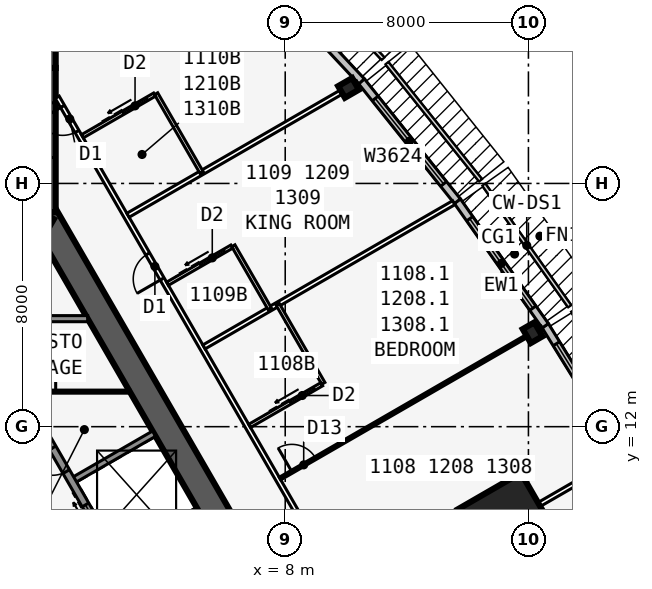
"""IFC4 building model, lengths in metres.
Left out: names, types, materials, properties, quantities, classifications, styles, units other than length and angle.
Written with IfcOpenShell. Run it as: python <this file> out.ifc"""

import sys

from ifc_helpers import new_model, si_unit, direction, frame, frame_2d, origin, origin_2d, place, context, subcontext, project, spatial, rectangle, i_section, extrude, element, fill, save


model = new_model("IFC4")
c1 = context("Model", 3, precision=1e-05, world=origin(), true_north=direction((0.0, 1.0)))
c2 = subcontext(c1, "Body", "Model", "MODEL_VIEW")
j1 = project(units=[si_unit("LENGTHUNIT", "METRE"), si_unit("PLANEANGLEUNIT", "RADIAN")], contexts=[c1])
p1 = place(None, origin())
s1 = spatial("IfcSite", under=j1, at=p1, CompositionType="ELEMENT")
p2 = place(p1, origin())
s2 = spatial("IfcBuilding", under=s1, at=p2, CompositionType="ELEMENT")
p3 = place(p2, frame((0.0, 0.0, 48.9)))
s3 = spatial("IfcBuildingStorey", under=s2, at=p3, CompositionType="ELEMENT", Elevation=48.9)
p4 = place(p3, frame((16.5, -9.526, 0.0), z_axis=(0.0, 0.0, 1.0), x_axis=(-0.499999749417, 0.866025548458, 0.0)))
e1 = element("IfcWall", 1, at=p4, inside=s3, PredefinedType="SHEAR", context=c2, shape_type="SweptSolid", body=[
    extrude(rectangle(XDim=33.0, YDim=0.9, at=frame_2d((16.5, 0.0))), origin(), (0.0, 0.0, 1.0), 3.4),
])
p5 = place(p4, frame((14.15, 0.0, 0.0)))
e2 = element("IfcOpeningElement", 2, at=p5, cuts=e1, PredefinedType="OPENING", context=c2, shape_type="SweptSolid", body=[
    extrude(rectangle(XDim=1.8, YDim=2.13, at=frame_2d((0.9, 1.065))), frame((0.0, 0.46, 0.0), z_axis=(0.0, -1.0, 0.0), x_axis=(1.0, 0.0, 0.0)), (0.0, 0.0, 1.0), 0.92),
])
p6 = place(p4, frame((12.6, 0.0, 0.0)))
e3 = element("IfcOpeningElement", 3, at=p6, cuts=e1, PredefinedType="OPENING", context=c2, shape_type="SweptSolid", body=[
    extrude(rectangle(XDim=1.0, YDim=2.13, at=frame_2d((0.5, 1.065))), frame((0.0, 0.46, 0.0), z_axis=(0.0, -1.0, 0.0), x_axis=(1.0, 0.0, 0.0)), (0.0, 0.0, 1.0), 0.92),
])
p7 = place(p3, frame((5.379, 2.586, 0.0), z_axis=(0.0, 0.0, 1.0), x_axis=(-0.500001375892, 0.866024609411, 0.0)))
e4 = element("IfcWall", 4, at=p7, inside=s3, PredefinedType="SOLIDWALL", context=c2, shape_type="SweptSolid", body=[
    extrude(rectangle(XDim=10.633, YDim=0.25, at=frame_2d((5.316, 0.0))), origin(), (0.0, 0.0, 1.0), 3.235),
])
p8 = place(p7, frame((9.164, 0.0, 0.0)))
e5 = element("IfcOpeningElement", 5, at=p8, cuts=e4, PredefinedType="OPENING", context=c2, shape_type="SweptSolid", body=[
    extrude(rectangle(XDim=0.9, YDim=2.13, at=frame_2d((0.45, 1.065))), frame((0.0, 0.135, 0.0), z_axis=(0.0, -1.0, 0.0), x_axis=(1.0, 0.0, 0.0)), (0.0, 0.0, 1.0), 0.27),
])
p9 = place(p7, frame((1.0, 0.0, 0.0)))
e6 = element("IfcOpeningElement", 6, at=p9, cuts=e4, PredefinedType="OPENING", context=c2, shape_type="SweptSolid", body=[
    extrude(rectangle(XDim=1.1, YDim=2.13, at=frame_2d((0.55, 1.065))), frame((0.0, 0.135, 0.0), z_axis=(0.0, -1.0, 0.0), x_axis=(1.0, 0.0, 0.0)), (0.0, 0.0, 1.0), 0.27),
])
p10 = place(p7, frame((3.9, 0.0, 0.0)))
e7 = element("IfcOpeningElement", 7, at=p10, cuts=e4, PredefinedType="OPENING", context=c2, shape_type="SweptSolid", body=[
    extrude(rectangle(XDim=1.1, YDim=2.13, at=frame_2d((0.55, 1.065))), frame((0.0, 0.135, 0.0), z_axis=(0.0, -1.0, 0.0), x_axis=(1.0, 0.0, 0.0)), (0.0, 0.0, 1.0), 0.27),
])
p11 = place(p7, frame((6.8, 0.0, 0.0)))
e8 = element("IfcOpeningElement", 8, at=p11, cuts=e4, PredefinedType="OPENING", context=c2, shape_type="SweptSolid", body=[
    extrude(rectangle(XDim=1.1, YDim=2.13, at=frame_2d((0.55, 1.065))), frame((0.0, 0.135, 0.0), z_axis=(0.0, -1.0, 0.0), x_axis=(1.0, 0.0, 0.0)), (0.0, 0.0, 1.0), 0.27),
])
for number, where, z_axis, x_axis in (
    (9, (2.429, 7.696, 0.0), (0.0, 0.0, 1.0), (0.866, 0.5, 0.0)),
    (10, (0.979, 10.207, 0.0), (0.0, 0.0, 1.0), (0.866, 0.5, 0.0)),
):
    element("IfcWall", number, at=place(p3, frame(where, z_axis=z_axis, x_axis=x_axis)), inside=s3, PredefinedType="SOLIDWALL", context=c2, shape_type="SweptSolid", body=[
        extrude(rectangle(XDim=3.125, YDim=0.2, at=frame_2d((1.562, 0.0))), origin(), (0.0, 0.0, 1.0), 3.235),
    ])
p12 = place(p3, frame((0.0, 19.052, 0.0), z_axis=(0.0, 0.0, 1.0), x_axis=(-0.499999749417, -0.866025548458, 0.0)))
e11 = element("IfcWall", 11, at=p12, inside=s3, PredefinedType="SHEAR", context=c2, shape_type="SweptSolid", body=[
    extrude(rectangle(XDim=33.0, YDim=0.9, at=frame_2d((16.5, 0.0))), origin(), (0.0, 0.0, 1.0), 3.4),
])
p13 = place(p12, frame((14.15, 0.0, 0.0)))
e12 = element("IfcOpeningElement", 12, at=p13, cuts=e11, PredefinedType="OPENING", context=c2, shape_type="SweptSolid", body=[
    extrude(rectangle(XDim=1.8, YDim=2.13, at=frame_2d((0.9, 1.065))), frame((0.0, 0.46, 0.0), z_axis=(0.0, -1.0, 0.0), x_axis=(1.0, 0.0, 0.0)), (0.0, 0.0, 1.0), 0.92),
])
p14 = place(p12, frame((12.6, 0.0, 0.0)))
e13 = element("IfcOpeningElement", 13, at=p14, cuts=e11, PredefinedType="OPENING", context=c2, shape_type="SweptSolid", body=[
    extrude(rectangle(XDim=1.0, YDim=2.13, at=frame_2d((0.5, 1.065))), frame((0.0, 0.46, 0.0), z_axis=(0.0, -1.0, 0.0), x_axis=(1.0, 0.0, 0.0)), (0.0, 0.0, 1.0), 0.92),
])
p15 = place(p3, frame((0.0, 19.052, 0.0), z_axis=(0.0, 0.0, 1.0), x_axis=(0.0, 1.0, 0.0)))
e14 = element("IfcWall", 14, at=p15, inside=s3, PredefinedType="SHEAR", context=c2, shape_type="SweptSolid", body=[
    extrude(rectangle(XDim=4.746, YDim=0.9, at=frame_2d((2.373, 0.0))), origin(), (0.0, 0.0, 1.0), 3.4),
])
p16 = place(p15, frame((1.8, 0.0, 0.0)))
e15 = element("IfcOpeningElement", 15, at=p16, cuts=e14, PredefinedType="OPENING", context=c2, shape_type="SweptSolid", body=[
    extrude(rectangle(XDim=1.8, YDim=2.13, at=frame_2d((0.9, 1.065))), frame((0.0, 0.46, 0.0), z_axis=(0.0, -1.0, 0.0), x_axis=(1.0, 0.0, 0.0)), (0.0, 0.0, 1.0), 0.92),
])
p17 = place(p3, frame((0.0, 23.799, 0.0), z_axis=(0.0, 0.0, 1.0), x_axis=(0.0, 1.0, 0.0)))
e16 = element("IfcWall", 16, at=p17, inside=s3, PredefinedType="SHEAR", context=c2, shape_type="SweptSolid", body=[
    extrude(rectangle(XDim=1.155, YDim=0.9, at=frame_2d((0.577, 0.0))), origin(), (0.0, 0.0, 1.0), 3.4),
])
for number, where, z_axis, x_axis in (
    (17, (16.137, 15.09, 0.0), (0.0, 0.0, 1.0), (0.866, 0.5, 0.0)),
    (18, (10.083, 23.142, 0.0), (0.0, 0.0, 1.0), (-0.5, 0.866, 0.0)),
):
    element("IfcColumn", number, at=place(p3, frame(where, z_axis=z_axis, x_axis=x_axis)), inside=s3, PredefinedType="COLUMN", context=c2, shape_type="SweptSolid", body=[
        extrude(i_section(OverallWidth=0.442, OverallDepth=0.531, WebThickness=0.066, FlangeThickness=0.106, at=origin_2d()), origin(), (0.0, 0.0, 1.0), 3.4),
    ])
p18 = place(p3, frame((15.312, 8.84, 0.0), z_axis=(0.0, 0.0, 1.0), x_axis=(0.866025403784, 0.5, 0.0)))
e19 = element("IfcColumn", 19, at=p18, inside=s3, PredefinedType="COLUMN", context=c2, shape_type="SweptSolid", body=[
    extrude(rectangle(XDim=2.4, YDim=2.4, at=origin_2d()), origin(), (0.0, 0.0, 1.0), 3.4),
])
p19 = place(p3, frame((19.182, 11.071, 0.0), z_axis=(0.0, 0.0, 1.0), x_axis=(-0.526132807704, 0.850402415717, 0.0)))
e20 = element("IfcWall", 20, at=p19, inside=s3, PredefinedType="STANDARD", context=c2, shape_type="SweptSolid", body=[
    extrude(rectangle(XDim=5.002, YDim=0.25, at=frame_2d((2.501, 0.0))), origin(), (0.0, 0.0, 1.0), 3.235),
])
p20 = place(p19, frame((0.701, 0.0, 0.45)))
e21 = element("IfcOpeningElement", 21, at=p20, cuts=e20, PredefinedType="OPENING", context=c2, shape_type="SweptSolid", body=[
    extrude(rectangle(XDim=3.6, YDim=2.4, at=frame_2d((1.8, 1.2))), frame((0.0, 0.135, 0.0), z_axis=(0.0, -1.0, 0.0), x_axis=(1.0, 0.0, 0.0)), (0.0, 0.0, 1.0), 0.27),
])
p21 = place(p3, frame((16.555, 15.318, 0.0), z_axis=(0.0, 0.0, 1.0), x_axis=(-0.5766431066, 0.81699616132, 0.0)))
e22 = element("IfcWall", 22, at=p21, inside=s3, PredefinedType="STANDARD", context=c2, shape_type="SweptSolid", body=[
    extrude(rectangle(XDim=5.021, YDim=0.25, at=frame_2d((2.51, 0.0))), origin(), (0.0, 0.0, 1.0), 3.235),
])
p22 = place(p21, frame((0.71, 0.0, 0.45)))
e23 = element("IfcOpeningElement", 23, at=p22, cuts=e22, PredefinedType="OPENING", context=c2, shape_type="SweptSolid", body=[
    extrude(rectangle(XDim=3.6, YDim=2.4, at=frame_2d((1.8, 1.2))), frame((0.0, 0.135, 0.0), z_axis=(0.0, -1.0, 0.0), x_axis=(1.0, 0.0, 0.0)), (0.0, 0.0, 1.0), 0.27),
])
p23 = place(p3, frame((13.664, 19.414, 0.0), z_axis=(0.0, 0.0, 1.0), x_axis=(-0.624594965756, 0.780948864364, 0.0)))
e24 = element("IfcWall", 24, at=p23, inside=s3, PredefinedType="STANDARD", context=c2, shape_type="SweptSolid", body=[
    extrude(rectangle(XDim=5.058, YDim=0.25, at=frame_2d((2.529, 0.0))), origin(), (0.0, 0.0, 1.0), 3.235),
])
p24 = place(p23, frame((0.729, 0.0, 0.45)))
e25 = element("IfcOpeningElement", 25, at=p24, cuts=e24, PredefinedType="OPENING", context=c2, shape_type="SweptSolid", body=[
    extrude(rectangle(XDim=3.6, YDim=2.4, at=frame_2d((1.8, 1.2))), frame((0.0, 0.135, 0.0), z_axis=(0.0, -1.0, 0.0), x_axis=(1.0, 0.0, 0.0)), (0.0, 0.0, 1.0), 0.27),
])
p25 = place(p3, frame((10.511, 23.357, 0.0), z_axis=(0.0, 0.0, 1.0), x_axis=(-0.682289646561, 0.731081964075, 0.0)))
e26 = element("IfcWall", 26, at=p25, inside=s3, PredefinedType="STANDARD", context=c2, shape_type="SweptSolid", body=[
    extrude(rectangle(XDim=8.211, YDim=0.25, at=frame_2d((4.105, 0.0))), origin(), (0.0, 0.0, 1.0), 3.235),
])
p26 = place(p25, frame((2.006, 0.0, 0.45)))
e27 = element("IfcOpeningElement", 27, at=p26, cuts=e26, PredefinedType="OPENING", context=c2, shape_type="SweptSolid", body=[
    extrude(rectangle(XDim=4.2, YDim=2.4, at=frame_2d((2.1, 1.2))), frame((0.0, 0.135, 0.0), z_axis=(0.0, -1.0, 0.0), x_axis=(1.0, 0.0, 0.0)), (0.0, 0.0, 1.0), 0.27),
])
p27 = place(p3, frame((20.027, -10.985, 0.0), z_axis=(0.0, 0.0, 1.0), x_axis=(-0.500001677587, 0.866024435227, 0.0)))
e28 = element("IfcWall", 28, at=p27, inside=s3, PredefinedType="PARTITIONING", context=c2, shape_type="SweptSolid", body=[
    extrude(rectangle(XDim=39.054, YDim=0.15, at=frame_2d((19.527, 0.0))), origin(), (0.0, 0.0, 1.0), 3.235),
])
p28 = place(p27, frame((1.558, 0.0, 0.0)))
e29 = element("IfcOpeningElement", 29, at=p28, cuts=e28, PredefinedType="OPENING", context=c2, shape_type="SweptSolid", body=[
    extrude(rectangle(XDim=0.95, YDim=2.13, at=frame_2d((0.475, 1.065))), frame((0.0, 0.085, 0.0), z_axis=(0.0, -1.0, 0.0), x_axis=(1.0, 0.0, 0.0)), (0.0, 0.0, 1.0), 0.17),
])
p29 = place(p27, frame((12.152, 0.0, 0.0)))
e30 = element("IfcOpeningElement", 30, at=p29, cuts=e28, PredefinedType="OPENING", context=c2, shape_type="SweptSolid", body=[
    extrude(rectangle(XDim=0.95, YDim=2.13, at=frame_2d((0.475, 1.065))), frame((0.0, 0.085, 0.0), z_axis=(0.0, -1.0, 0.0), x_axis=(1.0, 0.0, 0.0)), (0.0, 0.0, 1.0), 0.17),
])
p30 = place(p27, frame((17.152, 0.0, 0.0)))
e31 = element("IfcOpeningElement", 31, at=p30, cuts=e28, PredefinedType="OPENING", context=c2, shape_type="SweptSolid", body=[
    extrude(rectangle(XDim=0.95, YDim=2.13, at=frame_2d((0.475, 1.065))), frame((0.0, 0.085, 0.0), z_axis=(0.0, -1.0, 0.0), x_axis=(1.0, 0.0, 0.0)), (0.0, 0.0, 1.0), 0.17),
])
p31 = place(p27, frame((21.552, 0.0, 0.0)))
e32 = element("IfcOpeningElement", 32, at=p31, cuts=e28, PredefinedType="OPENING", context=c2, shape_type="SweptSolid", body=[
    extrude(rectangle(XDim=0.95, YDim=2.13, at=frame_2d((0.475, 1.065))), frame((0.0, 0.085, 0.0), z_axis=(0.0, -1.0, 0.0), x_axis=(1.0, 0.0, 0.0)), (0.0, 0.0, 1.0), 0.17),
])
p32 = place(p27, frame((32.152, 0.0, 0.0)))
e33 = element("IfcOpeningElement", 33, at=p32, cuts=e28, PredefinedType="OPENING", context=c2, shape_type="SweptSolid", body=[
    extrude(rectangle(XDim=0.95, YDim=2.13, at=frame_2d((0.475, 1.065))), frame((0.0, 0.085, 0.0), z_axis=(0.0, -1.0, 0.0), x_axis=(1.0, 0.0, 0.0)), (0.0, 0.0, 1.0), 0.17),
])
p33 = place(p27, frame((37.752, 0.0, 0.0)))
e34 = element("IfcOpeningElement", 34, at=p33, cuts=e28, PredefinedType="OPENING", context=c2, shape_type="SweptSolid", body=[
    extrude(rectangle(XDim=0.95, YDim=2.13, at=frame_2d((0.475, 1.065))), frame((0.0, 0.085, 0.0), z_axis=(0.0, -1.0, 0.0), x_axis=(1.0, 0.0, 0.0)), (0.0, 0.0, 1.0), 0.17),
])
p34 = place(p3, frame((10.329, 5.963, 0.0), z_axis=(0.0, 0.0, 1.0), x_axis=(0.866021688545, 0.500006434927, 0.0)))
e35 = element("IfcWall", 35, at=p34, inside=s3, PredefinedType="PARTITIONING", context=c2, shape_type="SweptSolid", body=[
    extrude(rectangle(XDim=10.096, YDim=0.15, at=frame_2d((5.048, 0.0))), origin(), (0.0, 0.0, 1.0), 2.389),
])
p35 = place(p3, frame((7.829, 10.293, 0.0), z_axis=(0.0, 0.0, 1.0), x_axis=(0.866016302457, 0.50001576363, 0.0)))
e36 = element("IfcWall", 36, at=p35, inside=s3, PredefinedType="PARTITIONING", context=c2, shape_type="SweptSolid", body=[
    extrude(rectangle(XDim=9.943, YDim=0.1, at=frame_2d((4.972, 0.0))), origin(), (0.0, 0.0, 1.0), 2.389),
])
p36 = place(p35, frame((0.45, 0.0, 0.0)))
e37 = element("IfcOpeningElement", 37, at=p36, cuts=e36, PredefinedType="OPENING", context=c2, shape_type="SweptSolid", body=[
    extrude(rectangle(XDim=0.9, YDim=2.13, at=frame_2d((0.45, 1.065))), frame((0.0, 0.06, 0.0), z_axis=(0.0, -1.0, 0.0), x_axis=(1.0, 0.0, 0.0)), (0.0, 0.0, 1.0), 0.12),
])
p37 = place(p3, frame((5.329, 14.623, 0.0), z_axis=(0.0, 0.0, 1.0), x_axis=(0.866018409083, 0.500012114982, 0.0)))
e38 = element("IfcWall", 38, at=p37, inside=s3, PredefinedType="PARTITIONING", context=c2, shape_type="SweptSolid", body=[
    extrude(rectangle(XDim=9.485, YDim=0.15, at=frame_2d((4.742, 0.0))), origin(), (0.0, 0.0, 1.0), 2.389),
])
p38 = place(p3, frame((2.829, 18.954, 0.0), z_axis=(0.0, 0.0, 1.0), x_axis=(0.866020536561, 0.500008430184, 0.0)))
e39 = element("IfcWall", 39, at=p38, inside=s3, PredefinedType="PARTITIONING", context=c2, shape_type="SweptSolid", body=[
    extrude(rectangle(XDim=8.72, YDim=0.15, at=frame_2d((4.36, 0.0))), origin(), (0.0, 0.0, 1.0), 2.389),
])
p39 = place(p3, frame((9.253, 13.425, 0.0), z_axis=(0.0, 0.0, 1.0), x_axis=(-0.499990139034, 0.866031096941, 0.0)))
e40 = element("IfcWall", 40, at=p39, inside=s3, PredefinedType="PLUMBINGWALL", context=c2, shape_type="SweptSolid", body=[
    extrude(rectangle(XDim=3.0, YDim=0.12, at=frame_2d((1.5, 0.0))), origin(), (0.0, 0.0, 1.0), 3.235),
])
p40 = place(p3, frame((6.829, 12.025, 0.0), z_axis=(0.0, 0.0, 1.0), x_axis=(0.866035715982, 0.499982138324, 0.0)))
e41 = element("IfcWall", 41, at=p40, inside=s3, PredefinedType="PLUMBINGWALL", context=c2, shape_type="SweptSolid", body=[
    extrude(rectangle(XDim=2.74, YDim=0.12, at=frame_2d((1.37, 0.0))), origin(), (0.0, 0.0, 1.0), 3.235),
])
p41 = place(p40, frame((1.55, 0.0, 0.0)))
e42 = element("IfcOpeningElement", 42, at=p41, cuts=e41, PredefinedType="OPENING", context=c2, shape_type="SweptSolid", body=[
    extrude(rectangle(XDim=0.9, YDim=2.13, at=frame_2d((0.45, 1.065))), frame((0.0, 0.07, 0.0), z_axis=(0.0, -1.0, 0.0), x_axis=(1.0, 0.0, 0.0)), (0.0, 0.0, 1.0), 0.14),
])
p42 = place(p3, frame((7.493, 15.873, 0.0), z_axis=(0.0, 0.0, 1.0), x_axis=(-0.499957262057, 0.866050077142, 0.0)))
e43 = element("IfcWall", 43, at=p42, inside=s3, PredefinedType="PLUMBINGWALL", context=c2, shape_type="SweptSolid", body=[
    extrude(rectangle(XDim=2.4, YDim=0.12, at=frame_2d((1.2, 0.0))), origin(), (0.0, 0.0, 1.0), 3.235),
])
p43 = place(p3, frame((4.128, 16.702, 0.0), z_axis=(0.0, 0.0, 1.0), x_axis=(0.866048967903, 0.499959183527, 0.0)))
e44 = element("IfcWall", 44, at=p43, inside=s3, PredefinedType="PLUMBINGWALL", context=c2, shape_type="SweptSolid", body=[
    extrude(rectangle(XDim=2.44, YDim=0.12, at=frame_2d((1.22, 0.0))), origin(), (0.0, 0.0, 1.0), 3.235),
])
p44 = place(p43, frame((1.25, 0.0, 0.0)))
e45 = element("IfcOpeningElement", 45, at=p44, cuts=e44, PredefinedType="OPENING", context=c2, shape_type="SweptSolid", body=[
    extrude(rectangle(XDim=0.9, YDim=2.13, at=frame_2d((0.45, 1.065))), frame((0.0, 0.07, 0.0), z_axis=(0.0, -1.0, 0.0), x_axis=(1.0, 0.0, 0.0)), (0.0, 0.0, 1.0), 0.14),
])
p45 = place(p3, frame((5.253, 20.354, 0.0), z_axis=(0.0, 0.0, 1.0), x_axis=(-0.499990139034, 0.866031096941, 0.0)))
e46 = element("IfcWall", 46, at=p45, inside=s3, PredefinedType="PLUMBINGWALL", context=c2, shape_type="SweptSolid", body=[
    extrude(rectangle(XDim=3.0, YDim=0.12, at=frame_2d((1.5, 0.0))), origin(), (0.0, 0.0, 1.0), 3.235),
])
p46 = place(p3, frame((1.329, 21.552, 0.0), z_axis=(0.0, 0.0, 1.0), x_axis=(0.865997131366, 0.500048966069, 0.0)))
e47 = element("IfcWall", 47, at=p46, inside=s3, PredefinedType="PLUMBINGWALL", context=c2, shape_type="SweptSolid", body=[
    extrude(rectangle(XDim=2.74, YDim=0.12, at=frame_2d((1.37, 0.0))), origin(), (0.0, 0.0, 1.0), 3.235),
])
p47 = place(p46, frame((1.55, 0.0, 0.0)))
e48 = element("IfcOpeningElement", 48, at=p47, cuts=e47, PredefinedType="OPENING", context=c2, shape_type="SweptSolid", body=[
    extrude(rectangle(XDim=0.9, YDim=2.13, at=frame_2d((0.45, 1.065))), frame((0.0, 0.07, 0.0), z_axis=(0.0, -1.0, 0.0), x_axis=(1.0, 0.0, 0.0)), (0.0, 0.0, 1.0), 0.14),
])
p48 = place(p3, frame((-1.501, 15.552, 0.0), z_axis=(0.0, 0.0, 1.0), x_axis=(1.0, 0.0, 0.0)))
e49 = element("IfcWall", 49, at=p48, inside=s3, PredefinedType="SOLIDWALL", context=c2, shape_type="SweptSolid", body=[
    extrude(rectangle(XDim=3.002, YDim=0.2, at=frame_2d((1.501, 0.0))), origin(), (0.0, 0.0, 1.0), 3.235),
])
p49 = place(p3, frame((-2.887, 13.153, 0.0), z_axis=(0.0, 0.0, 1.0), x_axis=(1.0, 0.0, 0.0)))
e50 = element("IfcWall", 50, at=p49, inside=s3, PredefinedType="PARTITIONING", context=c2, shape_type="SweptSolid", body=[
    extrude(rectangle(XDim=5.773, YDim=0.1, at=frame_2d((2.887, 0.0))), origin(), (0.0, 0.0, 1.0), 3.235),
])
p50 = place(p49, frame((2.437, 0.0, 0.0)))
e51 = element("IfcOpeningElement", 51, at=p50, cuts=e50, PredefinedType="OPENING", context=c2, shape_type="SweptSolid", body=[
    extrude(rectangle(XDim=0.9, YDim=2.13, at=frame_2d((0.45, 1.065))), frame((0.0, 0.06, 0.0), z_axis=(0.0, -1.0, 0.0), x_axis=(1.0, 0.0, 0.0)), (0.0, 0.0, 1.0), 0.12),
])
p51 = place(p20, origin())
e52 = element("IfcWindow", 52, at=p51, inside=s3, PartitioningType="SINGLE_PANEL", PredefinedType="WINDOW", context=c2, shape_type="SweptSolid", body=[
    extrude(rectangle(XDim=3.6, YDim=2.4, at=frame_2d((1.8, 1.2))), frame((0.0, 0.03, 0.0), z_axis=(0.0, -1.0, 0.0), x_axis=(1.0, 0.0, 0.0)), (0.0, 0.0, 1.0), 0.06),
])
fill(e21, e52)
p52 = place(p22, origin())
e53 = element("IfcWindow", 53, at=p52, inside=s3, PartitioningType="SINGLE_PANEL", PredefinedType="WINDOW", context=c2, shape_type="SweptSolid", body=[
    extrude(rectangle(XDim=3.6, YDim=2.4, at=frame_2d((1.8, 1.2))), frame((0.0, 0.03, 0.0), z_axis=(0.0, -1.0, 0.0), x_axis=(1.0, 0.0, 0.0)), (0.0, 0.0, 1.0), 0.06),
])
fill(e23, e53)
p53 = place(p24, origin())
e54 = element("IfcWindow", 54, at=p53, inside=s3, PartitioningType="SINGLE_PANEL", PredefinedType="WINDOW", context=c2, shape_type="SweptSolid", body=[
    extrude(rectangle(XDim=3.6, YDim=2.4, at=frame_2d((1.8, 1.2))), frame((0.0, 0.03, 0.0), z_axis=(0.0, -1.0, 0.0), x_axis=(1.0, 0.0, 0.0)), (0.0, 0.0, 1.0), 0.06),
])
fill(e25, e54)
p54 = place(p36, origin())
e55 = element("IfcDoor", 55, at=p54, inside=s3, OperationType="SINGLE_SWING_LEFT", PredefinedType="DOOR", context=c2, shape_type="SweptSolid", body=[
    extrude(rectangle(XDim=0.9, YDim=2.13, at=frame_2d((0.45, 1.065))), frame((0.0, 0.025, 0.0), z_axis=(0.0, -1.0, 0.0), x_axis=(1.0, 0.0, 0.0)), (0.0, 0.0, 1.0), 0.05),
])
fill(e37, e55)
p55 = place(p41, origin())
e56 = element("IfcDoor", 56, at=p55, inside=s3, OperationType="SLIDING_TO_LEFT", PredefinedType="DOOR", context=c2, shape_type="SweptSolid", body=[
    extrude(rectangle(XDim=0.9, YDim=2.13, at=frame_2d((0.45, 1.065))), frame((0.0, 0.025, 0.0), z_axis=(0.0, -1.0, 0.0), x_axis=(1.0, 0.0, 0.0)), (0.0, 0.0, 1.0), 0.05),
])
fill(e42, e56)
p56 = place(p44, origin())
e57 = element("IfcDoor", 57, at=p56, inside=s3, OperationType="SLIDING_TO_LEFT", PredefinedType="DOOR", context=c2, shape_type="SweptSolid", body=[
    extrude(rectangle(XDim=0.9, YDim=2.13, at=frame_2d((0.45, 1.065))), frame((0.0, 0.025, 0.0), z_axis=(0.0, -1.0, 0.0), x_axis=(1.0, 0.0, 0.0)), (0.0, 0.0, 1.0), 0.05),
])
fill(e45, e57)
p57 = place(p32, origin())
e58 = element("IfcDoor", 58, at=p57, inside=s3, OperationType="SINGLE_SWING_LEFT", PredefinedType="DOOR", context=c2, shape_type="SweptSolid", body=[
    extrude(rectangle(XDim=0.95, YDim=2.13, at=frame_2d((0.475, 1.065))), frame((0.0, 0.025, 0.0), z_axis=(0.0, -1.0, 0.0), x_axis=(1.0, 0.0, 0.0)), (0.0, 0.0, 1.0), 0.05),
])
fill(e33, e58)
p58 = place(p47, origin())
e59 = element("IfcDoor", 59, at=p58, inside=s3, OperationType="SLIDING_TO_LEFT", PredefinedType="DOOR", context=c2, shape_type="SweptSolid", body=[
    extrude(rectangle(XDim=0.9, YDim=2.13, at=frame_2d((0.45, 1.065))), frame((0.0, 0.025, 0.0), z_axis=(0.0, -1.0, 0.0), x_axis=(1.0, 0.0, 0.0)), (0.0, 0.0, 1.0), 0.05),
])
fill(e48, e59)
p59 = place(p33, origin())
e60 = element("IfcDoor", 60, at=p59, inside=s3, OperationType="SINGLE_SWING_RIGHT", PredefinedType="DOOR", context=c2, shape_type="SweptSolid", body=[
    extrude(rectangle(XDim=0.95, YDim=2.13, at=frame_2d((0.475, 1.065))), frame((0.0, 0.025, 0.0), z_axis=(0.0, -1.0, 0.0), x_axis=(1.0, 0.0, 0.0)), (0.0, 0.0, 1.0), 0.05),
])
fill(e34, e60)
p60 = place(p50, origin())
e61 = element("IfcDoor", 61, at=p60, inside=s3, OperationType="SINGLE_SWING_RIGHT", PredefinedType="DOOR", context=c2, shape_type="SweptSolid", body=[
    extrude(rectangle(XDim=0.9, YDim=2.13, at=frame_2d((0.45, 1.065))), frame((0.0, 0.025, 0.0), z_axis=(0.0, -1.0, 0.0), x_axis=(1.0, 0.0, 0.0)), (0.0, 0.0, 1.0), 0.05),
])
fill(e51, e61)
p61 = place(p8, origin())
e62 = element("IfcDoor", 62, at=p61, inside=s3, OperationType="SINGLE_SWING_RIGHT", PredefinedType="DOOR", context=c2, shape_type="SweptSolid", body=[
    extrude(rectangle(XDim=0.9, YDim=2.13, at=frame_2d((0.45, 1.065))), frame((0.0, 0.025, 0.0), z_axis=(0.0, -1.0, 0.0), x_axis=(1.0, 0.0, 0.0)), (0.0, 0.0, 1.0), 0.05),
])
fill(e5, e62)
p62 = place(p11, origin())
e63 = element("IfcDoor", 63, at=p62, inside=s3, OperationType="DOUBLE_DOOR_SLIDING", PredefinedType="USERDEFINED", context=c2, shape_type="SweptSolid", body=[
    extrude(rectangle(XDim=1.1, YDim=2.13, at=frame_2d((0.55, 1.065))), frame((0.0, 0.025, 0.0), z_axis=(0.0, -1.0, 0.0), x_axis=(1.0, 0.0, 0.0)), (0.0, 0.0, 1.0), 0.05),
])
fill(e8, e63)
save(model, sys.argv[1])
